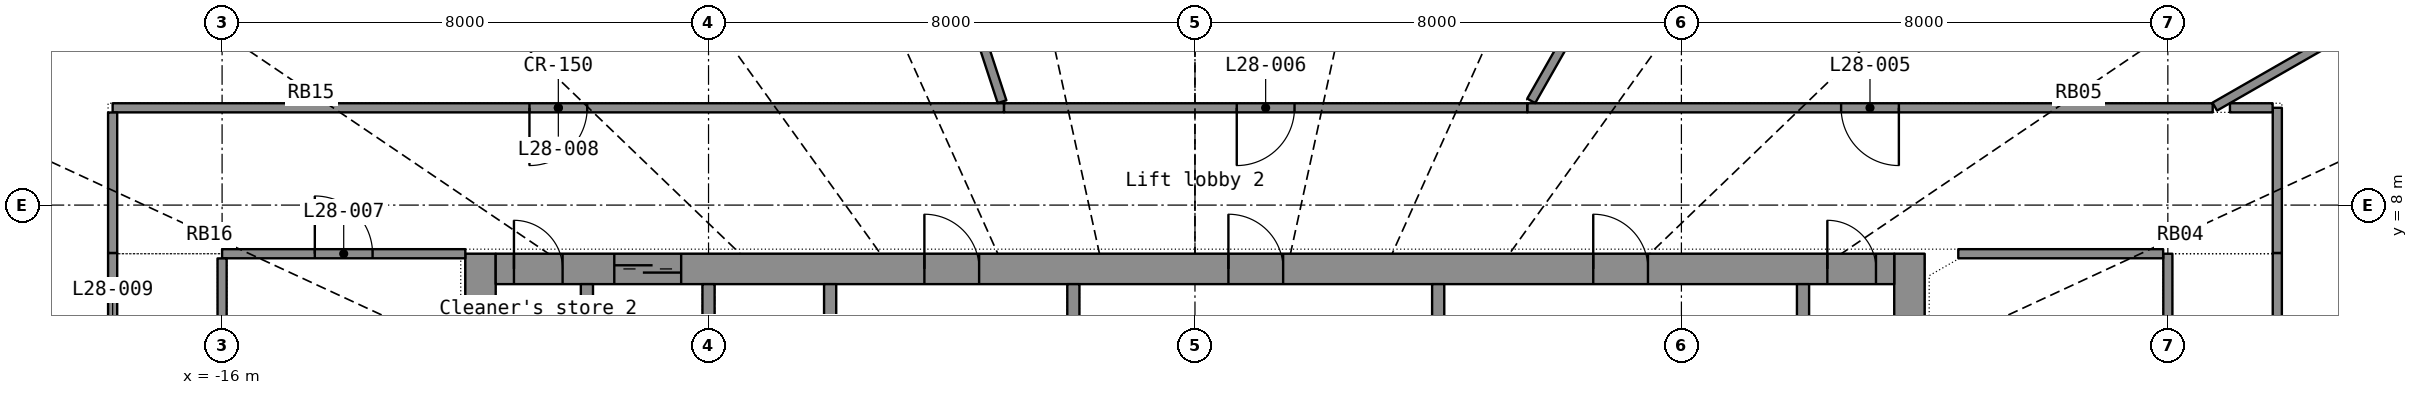
"""IFC4 building model, lengths in metres.
Left out: names, types, materials, properties, quantities, classifications, styles, units other than length and angle.
Written with IfcOpenShell. Run it as: python <this file> out.ifc"""

import sys

from ifc_helpers import new_model, si_unit, direction, frame, frame_2d, origin, place, context, subcontext, project, spatial, rectangle, extrude, element, fill, save


model = new_model("IFC4")
c1 = context("Model", 3, precision=1e-05, world=origin(), true_north=direction((0.0, 1.0)))
c2 = subcontext(c1, "Body", "Model", "MODEL_VIEW")
j1 = project(units=[si_unit("LENGTHUNIT", "METRE"), si_unit("PLANEANGLEUNIT", "RADIAN")], contexts=[c1])
p1 = place(None, origin())
s1 = spatial("IfcSite", under=j1, at=p1, CompositionType="ELEMENT")
p2 = place(p1, origin())
s2 = spatial("IfcBuilding", under=s1, at=p2, CompositionType="ELEMENT")
p3 = place(p2, frame((0.0, 0.0, 119.3)))
s3 = spatial("IfcBuildingStorey", under=s2, at=p3, CompositionType="ELEMENT", Elevation=119.3)
p4 = place(p3, frame((-11.75, -7.2, 0.0), z_axis=(0.0, 0.0, 1.0), x_axis=(0.0, 1.0, 0.0)))
e1 = element("IfcWall", 1, at=p4, inside=s3, PredefinedType="SHEAR", context=c2, shape_type="SweptSolid", body=[
    extrude(rectangle(XDim=14.4, YDim=0.5, at=frame_2d((7.2, 0.0))), origin(), (0.0, 0.0, 1.0), 3.3),
])
p5 = place(p4, frame((6.5, 0.0, 0.0)))
e2 = element("IfcOpeningElement", 2, at=p5, cuts=e1, PredefinedType="OPENING", context=c2, shape_type="SweptSolid", body=[
    extrude(rectangle(XDim=1.4, YDim=2.2, at=frame_2d((0.7, 1.1))), frame((0.0, 0.26, 0.0), z_axis=(0.0, -1.0, 0.0), x_axis=(1.0, 0.0, 0.0)), (0.0, 0.0, 1.0), 0.52),
])
p6 = place(p3, frame((11.75, -7.2, 0.0), z_axis=(0.0, 0.0, 1.0), x_axis=(0.0, 1.0, 0.0)))
e3 = element("IfcWall", 3, at=p6, inside=s3, PredefinedType="SHEAR", context=c2, shape_type="SweptSolid", body=[
    extrude(rectangle(XDim=14.4, YDim=0.5, at=frame_2d((7.2, 0.0))), origin(), (0.0, 0.0, 1.0), 3.3),
])
p7 = place(p6, frame((6.5, 0.0, 0.0)))
e4 = element("IfcOpeningElement", 4, at=p7, cuts=e3, PredefinedType="OPENING", context=c2, shape_type="SweptSolid", body=[
    extrude(rectangle(XDim=1.4, YDim=2.2, at=frame_2d((0.7, 1.1))), frame((0.0, 0.26, 0.0), z_axis=(0.0, -1.0, 0.0), x_axis=(1.0, 0.0, 0.0)), (0.0, 0.0, 1.0), 0.52),
])
p8 = place(p3, frame((-11.5, 6.95, 0.0), z_axis=(0.0, 0.0, 1.0), x_axis=(1.0, 0.0, 0.0)))
e5 = element("IfcWall", 5, at=p8, inside=s3, PredefinedType="SHEAR", context=c2, shape_type="SweptSolid", body=[
    extrude(rectangle(XDim=23.0, YDim=0.5, at=frame_2d((11.5, 0.0))), origin(), (0.0, 0.0, 1.0), 3.3),
])
p9 = place(p8, frame((1.95, 0.0, 0.0)))
e6 = element("IfcOpeningElement", 6, at=p9, cuts=e5, PredefinedType="OPENING", context=c2, shape_type="SweptSolid", body=[
    extrude(rectangle(XDim=1.1, YDim=2.2, at=frame_2d((0.55, 1.1))), frame((0.0, 0.26, 0.0), z_axis=(0.0, -1.0, 0.0), x_axis=(1.0, 0.0, 0.0)), (0.0, 0.0, 1.0), 0.52),
])
p10 = place(p8, frame((7.05, 0.0, 0.0)))
e7 = element("IfcOpeningElement", 7, at=p10, cuts=e5, PredefinedType="OPENING", context=c2, shape_type="SweptSolid", body=[
    extrude(rectangle(XDim=0.9, YDim=2.1, at=frame_2d((0.45, 1.05))), frame((0.0, 0.26, 0.0), z_axis=(0.0, -1.0, 0.0), x_axis=(1.0, 0.0, 0.0)), (0.0, 0.0, 1.0), 0.52),
])
p11 = place(p8, frame((12.05, 0.0, 0.0)))
e8 = element("IfcOpeningElement", 8, at=p11, cuts=e5, PredefinedType="OPENING", context=c2, shape_type="SweptSolid", body=[
    extrude(rectangle(XDim=0.9, YDim=2.1, at=frame_2d((0.45, 1.05))), frame((0.0, 0.26, 0.0), z_axis=(0.0, -1.0, 0.0), x_axis=(1.0, 0.0, 0.0)), (0.0, 0.0, 1.0), 0.52),
])
p12 = place(p8, frame((18.05, 0.0, 0.0)))
e9 = element("IfcOpeningElement", 9, at=p12, cuts=e5, PredefinedType="OPENING", context=c2, shape_type="SweptSolid", body=[
    extrude(rectangle(XDim=0.9, YDim=2.1, at=frame_2d((0.45, 1.05))), frame((0.0, 0.26, 0.0), z_axis=(0.0, -1.0, 0.0), x_axis=(1.0, 0.0, 0.0)), (0.0, 0.0, 1.0), 0.52),
])
p13 = place(p8, frame((0.3, 0.0, 0.0)))
e10 = element("IfcOpeningElement", 10, at=p13, cuts=e5, PredefinedType="OPENING", context=c2, shape_type="SweptSolid", body=[
    extrude(rectangle(XDim=0.8, YDim=2.05, at=frame_2d((0.4, 1.025))), frame((0.0, 0.26, 0.0), z_axis=(0.0, -1.0, 0.0), x_axis=(1.0, 0.0, 0.0)), (0.0, 0.0, 1.0), 0.52),
])
p14 = place(p8, frame((21.9, 0.0, 0.0)))
e11 = element("IfcOpeningElement", 11, at=p14, cuts=e5, PredefinedType="OPENING", context=c2, shape_type="SweptSolid", body=[
    extrude(rectangle(XDim=0.8, YDim=2.05, at=frame_2d((0.4, 1.025))), frame((0.0, 0.26, 0.0), z_axis=(0.0, -1.0, 0.0), x_axis=(1.0, 0.0, 0.0)), (0.0, 0.0, 1.0), 0.52),
])
for number, where, z_axis, x_axis in (
    (12, (-10.0, 3.9, 0.0), (0.0, 0.0, 1.0), (0.0, 1.0, 0.0)),
    (13, (-8.0, 3.9, 0.0), (0.0, 0.0, 1.0), (0.0, 1.0, 0.0)),
    (14, (-6.0, 3.9, 0.0), (0.0, 0.0, 1.0), (0.0, 1.0, 0.0)),
    (15, (10.0, 3.9, 0.0), (0.0, 0.0, 1.0), (0.0, 1.0, 0.0)),
):
    element("IfcWall", number, at=place(p3, frame(where, z_axis=z_axis, x_axis=x_axis)), inside=s3, PredefinedType="SHEAR", context=c2, shape_type="SweptSolid", body=[
        extrude(rectangle(XDim=2.8, YDim=0.2, at=frame_2d((1.4, 0.0))), origin(), (0.0, 0.0, 1.0), 3.3),
    ])
for number, where, z_axis, x_axis in (
    (16, (-2.0, 3.9, 0.0), (0.0, 0.0, 1.0), (0.0, 1.0, 0.0)),
    (17, (4.0, 3.9, 0.0), (0.0, 0.0, 1.0), (0.0, 1.0, 0.0)),
):
    element("IfcWall", number, at=place(p3, frame(where, z_axis=z_axis, x_axis=x_axis)), inside=s3, PredefinedType="PARTITIONING", context=c2, shape_type="SweptSolid", body=[
        extrude(rectangle(XDim=2.8, YDim=0.2, at=frame_2d((1.4, 0.0))), origin(), (0.0, 0.0, 1.0), 3.3),
    ])
p15 = place(p3, frame((-3.14, 9.6, 0.0), z_axis=(0.0, 0.0, 1.0), x_axis=(-1.0, 0.0, 0.0)))
e18 = element("IfcWall", 18, at=p15, inside=s3, PredefinedType="PARTITIONING", context=c2, shape_type="SweptSolid", body=[
    extrude(rectangle(XDim=14.66, YDim=0.15, at=frame_2d((7.33, 0.0))), origin(), (0.0, 0.0, 1.0), 2.4),
])
p16 = place(p15, frame((6.855, 0.0, 0.0)))
e19 = element("IfcOpeningElement", 19, at=p16, cuts=e18, PredefinedType="OPENING", context=c2, shape_type="SweptSolid", body=[
    extrude(rectangle(XDim=0.95, YDim=2.15, at=frame_2d((0.475, 1.075))), frame((0.0, 0.085, 0.0), z_axis=(0.0, -1.0, 0.0), x_axis=(1.0, 0.0, 0.0)), (0.0, 0.0, 1.0), 0.17),
])
p17 = place(p3, frame((16.738, 9.6, 0.0), z_axis=(0.0, 0.0, 1.0), x_axis=(-1.0, 0.0, 0.0)))
e20 = element("IfcWall", 20, at=p17, inside=s3, PredefinedType="PARTITIONING", context=c2, shape_type="SweptSolid", body=[
    extrude(rectangle(XDim=11.273, YDim=0.15, at=frame_2d((5.636, 0.0))), origin(), (0.0, 0.0, 1.0), 2.4),
])
p18 = place(p17, frame((5.161, 0.0, 0.0)))
e21 = element("IfcOpeningElement", 21, at=p18, cuts=e20, PredefinedType="OPENING", context=c2, shape_type="SweptSolid", body=[
    extrude(rectangle(XDim=0.95, YDim=2.15, at=frame_2d((0.475, 1.075))), frame((0.0, 0.085, 0.0), z_axis=(0.0, -1.0, 0.0), x_axis=(1.0, 0.0, 0.0)), (0.0, 0.0, 1.0), 0.17),
])
p19 = place(p3, frame((-6.49, 19.841, 0.0), z_axis=(0.0, 0.0, 1.0), x_axis=(0.310902644, -0.950441763, 0.0)))
e22 = element("IfcWall", 22, at=p19, inside=s3, PredefinedType="PARTITIONING", context=c2, shape_type="SweptSolid", body=[
    extrude(rectangle(XDim=10.669, YDim=0.15, at=frame_2d((5.335, 0.0))), origin(), (0.0, 0.0, 1.0), 2.4),
])
p20 = place(p3, frame((10.598, 18.617, 0.0), z_axis=(0.0, 0.0, 1.0), x_axis=(-0.494739643, -0.869041245, 0.0)))
e23 = element("IfcWall", 23, at=p20, inside=s3, PredefinedType="PARTITIONING", context=c2, shape_type="SweptSolid", body=[
    extrude(rectangle(XDim=10.245, YDim=0.15, at=frame_2d((5.123, 0.0))), origin(), (0.0, 0.0, 1.0), 2.4),
])
p21 = place(p3, frame((5.464, 9.6, 0.0), z_axis=(0.0, 0.0, 1.0), x_axis=(-1.0, 0.0, 0.0)))
e24 = element("IfcWall", 24, at=p21, inside=s3, PredefinedType="PARTITIONING", context=c2, shape_type="SweptSolid", body=[
    extrude(rectangle(XDim=8.604, YDim=0.15, at=frame_2d((4.302, 0.0))), origin(), (0.0, 0.0, 1.0), 2.4),
])
p22 = place(p21, frame((3.827, 0.0, 0.0)))
e25 = element("IfcOpeningElement", 25, at=p22, cuts=e24, PredefinedType="OPENING", context=c2, shape_type="SweptSolid", body=[
    extrude(rectangle(XDim=0.95, YDim=2.15, at=frame_2d((0.475, 1.075))), frame((0.0, 0.085, 0.0), z_axis=(0.0, -1.0, 0.0), x_axis=(1.0, 0.0, 0.0)), (0.0, 0.0, 1.0), 0.17),
])
p23 = place(p3, frame((17.8, -1.276, 0.0), z_axis=(0.0, 0.0, 1.0), x_axis=(0.0, 1.0, 0.0)))
e26 = element("IfcWall", 26, at=p23, inside=s3, PredefinedType="PARTITIONING", context=c2, shape_type="SweptSolid", body=[
    extrude(rectangle(XDim=8.488, YDim=0.15, at=frame_2d((4.244, 0.0))), origin(), (0.0, 0.0, 1.0), 2.4),
])
p24 = place(p23, frame((3.769, 0.0, 0.0)))
e27 = element("IfcOpeningElement", 27, at=p24, cuts=e26, PredefinedType="OPENING", context=c2, shape_type="SweptSolid", body=[
    extrude(rectangle(XDim=0.95, YDim=2.15, at=frame_2d((0.475, 1.075))), frame((0.0, 0.085, 0.0), z_axis=(0.0, -1.0, 0.0), x_axis=(1.0, 0.0, 0.0)), (0.0, 0.0, 1.0), 0.17),
])
p25 = place(p3, frame((16.0, 7.2, 0.0), z_axis=(0.0, 0.0, 1.0), x_axis=(0.0, -1.0, 0.0)))
e28 = element("IfcWall", 28, at=p25, inside=s3, PredefinedType="PARTITIONING", context=c2, shape_type="SweptSolid", body=[
    extrude(rectangle(XDim=6.3, YDim=0.15, at=frame_2d((3.15, 0.0))), origin(), (0.0, 0.0, 1.0), 2.4),
])
p26 = place(p25, frame((2.675, 0.0, 0.0)))
e29 = element("IfcOpeningElement", 29, at=p26, cuts=e28, PredefinedType="OPENING", context=c2, shape_type="SweptSolid", body=[
    extrude(rectangle(XDim=0.95, YDim=2.15, at=frame_2d((0.475, 1.075))), frame((0.0, 0.085, 0.0), z_axis=(0.0, -1.0, 0.0), x_axis=(1.0, 0.0, 0.0)), (0.0, 0.0, 1.0), 0.17),
])
p27 = place(p3, frame((20.553, 11.788, 0.0), z_axis=(0.0, 0.0, 1.0), x_axis=(-0.86746307, -0.497501581, 0.0)))
e30 = element("IfcWall", 30, at=p27, inside=s3, PredefinedType="PARTITIONING", context=c2, shape_type="SweptSolid", body=[
    extrude(rectangle(XDim=4.359, YDim=0.15, at=frame_2d((2.179, 0.0))), origin(), (0.0, 0.0, 1.0), 2.4),
])
p28 = place(p3, frame((-16.0, 7.2, 0.0), z_axis=(0.0, 0.0, 1.0), x_axis=(1.0, 0.0, 0.0)))
e31 = element("IfcWall", 31, at=p28, inside=s3, PredefinedType="PARTITIONING", context=c2, shape_type="SweptSolid", body=[
    extrude(rectangle(XDim=4.0, YDim=0.15, at=frame_2d((2.0, 0.0))), origin(), (0.0, 0.0, 1.0), 2.4),
])
p29 = place(p28, frame((1.525, 0.0, 0.0)))
e32 = element("IfcOpeningElement", 32, at=p29, cuts=e31, PredefinedType="OPENING", context=c2, shape_type="SweptSolid", body=[
    extrude(rectangle(XDim=0.95, YDim=2.15, at=frame_2d((0.475, 1.075))), frame((0.0, 0.085, 0.0), z_axis=(0.0, -1.0, 0.0), x_axis=(1.0, 0.0, 0.0)), (0.0, 0.0, 1.0), 0.17),
])
p30 = place(p3, frame((-16.0, 3.587, 0.0), z_axis=(0.0, 0.0, 1.0), x_axis=(0.0, 1.0, 0.0)))
e33 = element("IfcWall", 33, at=p30, inside=s3, PredefinedType="PARTITIONING", context=c2, shape_type="SweptSolid", body=[
    extrude(rectangle(XDim=3.536, YDim=0.15, at=frame_2d((1.768, 0.0))), origin(), (0.0, 0.0, 1.0), 2.4),
])
p31 = place(p3, frame((12.553, 7.2, 0.0), z_axis=(0.0, 0.0, 1.0), x_axis=(1.0, 0.0, 0.0)))
e34 = element("IfcWall", 34, at=p31, inside=s3, PredefinedType="PARTITIONING", context=c2, shape_type="SweptSolid", body=[
    extrude(rectangle(XDim=3.37, YDim=0.15, at=frame_2d((1.685, 0.0))), origin(), (0.0, 0.0, 1.0), 2.4),
])
p32 = place(p3, frame((-17.8, 7.212, 0.0), z_axis=(0.0, 0.0, 1.0), x_axis=(0.0, -1.0, 0.0)))
e35 = element("IfcWall", 35, at=p32, inside=s3, PredefinedType="PARTITIONING", context=c2, shape_type="SweptSolid", body=[
    extrude(rectangle(XDim=3.21, YDim=0.15, at=frame_2d((1.605, 0.0))), origin(), (0.0, 0.0, 1.0), 2.4),
])
p33 = place(p32, frame((1.13, 0.0, 0.0)))
e36 = element("IfcOpeningElement", 36, at=p33, cuts=e35, PredefinedType="OPENING", context=c2, shape_type="SweptSolid", body=[
    extrude(rectangle(XDim=0.95, YDim=2.15, at=frame_2d((0.475, 1.075))), frame((0.0, 0.085, 0.0), z_axis=(0.0, -1.0, 0.0), x_axis=(1.0, 0.0, 0.0)), (0.0, 0.0, 1.0), 0.17),
])
p34 = place(p3, frame((-17.8, 9.523, 0.0), z_axis=(0.0, 0.0, 1.0), x_axis=(0.0, -1.0, 0.0)))
e37 = element("IfcWall", 37, at=p34, inside=s3, PredefinedType="PARTITIONING", context=c2, shape_type="SweptSolid", body=[
    extrude(rectangle(XDim=2.31, YDim=0.15, at=frame_2d((1.155, 0.0))), origin(), (0.0, 0.0, 1.0), 2.4),
])
p35 = place(p3, frame((17.8, 7.213, 0.0), z_axis=(0.0, 0.0, 1.0), x_axis=(0.0, 1.0, 0.0)))
e38 = element("IfcWall", 38, at=p35, inside=s3, PredefinedType="PARTITIONING", context=c2, shape_type="SweptSolid", body=[
    extrude(rectangle(XDim=2.387, YDim=0.15, at=frame_2d((1.194, 0.0))), origin(), (0.0, 0.0, 1.0), 2.4),
])
p36 = place(p3, frame((17.723, 9.6, 0.0), z_axis=(0.0, 0.0, 1.0), x_axis=(-1.0, 0.0, 0.0)))
e39 = element("IfcWall", 39, at=p36, inside=s3, PredefinedType="PARTITIONING", context=c2, shape_type="SweptSolid", body=[
    extrude(rectangle(XDim=0.701, YDim=0.15, at=frame_2d((0.351, 0.0))), origin(), (0.0, 0.0, 1.0), 2.4),
])
p37 = place(p9, origin())
e40 = element("IfcDoor", 40, at=p37, inside=s3, OperationType="DOUBLE_DOOR_SLIDING", PredefinedType="DOOR", context=c2, shape_type="SweptSolid", body=[
    extrude(rectangle(XDim=1.1, YDim=2.2, at=frame_2d((0.55, 1.1))), frame((0.0, 0.025, 0.0), z_axis=(0.0, -1.0, 0.0), x_axis=(1.0, 0.0, 0.0)), (0.0, 0.0, 1.0), 0.05),
])
fill(e6, e40)
p38 = place(p10, origin())
e41 = element("IfcDoor", 41, at=p38, inside=s3, OperationType="SINGLE_SWING_LEFT", PredefinedType="DOOR", context=c2, shape_type="SweptSolid", body=[
    extrude(rectangle(XDim=0.9, YDim=2.1, at=frame_2d((0.45, 1.05))), frame((0.0, 0.025, 0.0), z_axis=(0.0, -1.0, 0.0), x_axis=(1.0, 0.0, 0.0)), (0.0, 0.0, 1.0), 0.05),
])
fill(e7, e41)
p39 = place(p11, origin())
e42 = element("IfcDoor", 42, at=p39, inside=s3, OperationType="SINGLE_SWING_LEFT", PredefinedType="DOOR", context=c2, shape_type="SweptSolid", body=[
    extrude(rectangle(XDim=0.9, YDim=2.1, at=frame_2d((0.45, 1.05))), frame((0.0, 0.025, 0.0), z_axis=(0.0, -1.0, 0.0), x_axis=(1.0, 0.0, 0.0)), (0.0, 0.0, 1.0), 0.05),
])
fill(e8, e42)
p40 = place(p12, origin())
e43 = element("IfcDoor", 43, at=p40, inside=s3, OperationType="SINGLE_SWING_LEFT", PredefinedType="DOOR", context=c2, shape_type="SweptSolid", body=[
    extrude(rectangle(XDim=0.9, YDim=2.1, at=frame_2d((0.45, 1.05))), frame((0.0, 0.025, 0.0), z_axis=(0.0, -1.0, 0.0), x_axis=(1.0, 0.0, 0.0)), (0.0, 0.0, 1.0), 0.05),
])
fill(e9, e43)
p41 = place(p13, origin())
e44 = element("IfcDoor", 44, at=p41, inside=s3, OperationType="SINGLE_SWING_LEFT", PredefinedType="DOOR", context=c2, shape_type="SweptSolid", body=[
    extrude(rectangle(XDim=0.8, YDim=2.05, at=frame_2d((0.4, 1.025))), frame((0.0, 0.025, 0.0), z_axis=(0.0, -1.0, 0.0), x_axis=(1.0, 0.0, 0.0)), (0.0, 0.0, 1.0), 0.05),
])
fill(e10, e44)
p42 = place(p14, origin())
e45 = element("IfcDoor", 45, at=p42, inside=s3, OperationType="SINGLE_SWING_LEFT", PredefinedType="DOOR", context=c2, shape_type="SweptSolid", body=[
    extrude(rectangle(XDim=0.8, YDim=2.05, at=frame_2d((0.4, 1.025))), frame((0.0, 0.025, 0.0), z_axis=(0.0, -1.0, 0.0), x_axis=(1.0, 0.0, 0.0)), (0.0, 0.0, 1.0), 0.05),
])
fill(e11, e45)
p43 = place(p18, origin())
e46 = element("IfcDoor", 46, at=p43, inside=s3, OperationType="SINGLE_SWING_LEFT", PredefinedType="DOOR", context=c2, shape_type="SweptSolid", body=[
    extrude(rectangle(XDim=0.95, YDim=2.15, at=frame_2d((0.475, 1.075))), frame((0.0, 0.025, 0.0), z_axis=(0.0, -1.0, 0.0), x_axis=(1.0, 0.0, 0.0)), (0.0, 0.0, 1.0), 0.05),
])
fill(e21, e46)
p44 = place(p22, origin())
e47 = element("IfcDoor", 47, at=p44, inside=s3, OperationType="SINGLE_SWING_RIGHT", PredefinedType="DOOR", context=c2, shape_type="SweptSolid", body=[
    extrude(rectangle(XDim=0.95, YDim=2.15, at=frame_2d((0.475, 1.075))), frame((0.0, 0.025, 0.0), z_axis=(0.0, -1.0, 0.0), x_axis=(1.0, 0.0, 0.0)), (0.0, 0.0, 1.0), 0.05),
])
fill(e25, e47)
p45 = place(p29, origin())
e48 = element("IfcDoor", 48, at=p45, inside=s3, OperationType="SINGLE_SWING_LEFT", PredefinedType="DOOR", context=c2, shape_type="SweptSolid", body=[
    extrude(rectangle(XDim=0.95, YDim=2.15, at=frame_2d((0.475, 1.075))), frame((0.0, 0.025, 0.0), z_axis=(0.0, -1.0, 0.0), x_axis=(1.0, 0.0, 0.0)), (0.0, 0.0, 1.0), 0.05),
])
fill(e32, e48)
p46 = place(p16, origin())
e49 = element("IfcDoor", 49, at=p46, inside=s3, OperationType="SINGLE_SWING_RIGHT", PredefinedType="DOOR", context=c2, shape_type="SweptSolid", body=[
    extrude(rectangle(XDim=0.95, YDim=2.15, at=frame_2d((0.475, 1.075))), frame((0.0, 0.025, 0.0), z_axis=(0.0, -1.0, 0.0), x_axis=(1.0, 0.0, 0.0)), (0.0, 0.0, 1.0), 0.05),
])
fill(e19, e49)
save(model, sys.argv[1])
